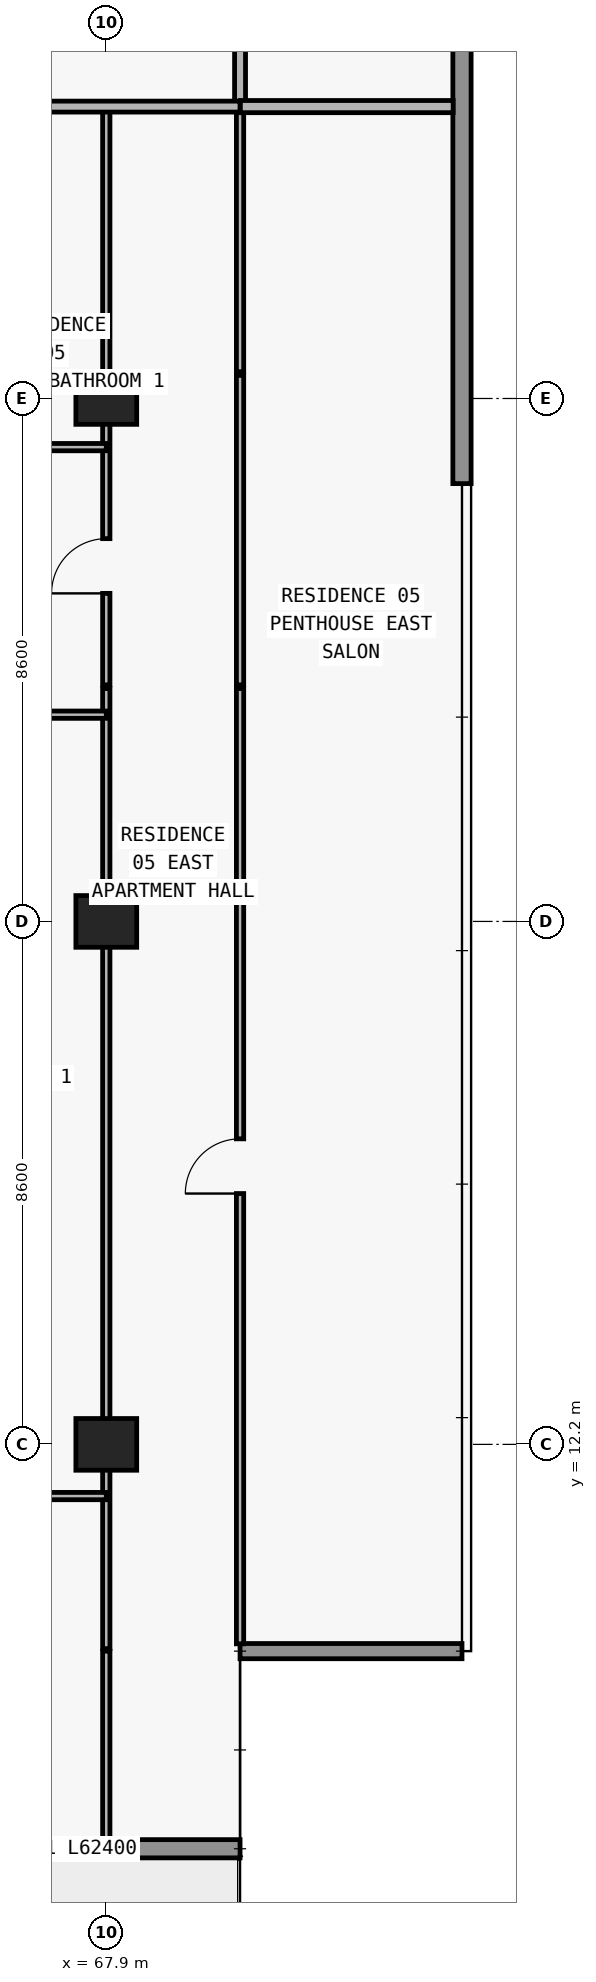
"""IFC4 building model, lengths in metres.
Left out: names, types, materials, properties, quantities, classifications, styles, units other than length and angle.
Written with IfcOpenShell. Run it as: python <this file> out.ifc"""

import sys

from ifc_helpers import new_model, si_unit, direction, frame, frame_2d, origin, origin_2d, place, context, subcontext, project, spatial, rectangle, extrude, element, fill, save


model = new_model("IFC4")
c1 = context("Model", 3, precision=1e-05, world=origin(), true_north=direction((0.0, 1.0)))
c2 = subcontext(c1, "Body", "Model", "MODEL_VIEW")
j1 = project(units=[si_unit("LENGTHUNIT", "METRE"), si_unit("PLANEANGLEUNIT", "RADIAN")], contexts=[c1])
p1 = place(None, origin())
s1 = spatial("IfcSite", under=j1, at=p1, CompositionType="ELEMENT")
p2 = place(p1, origin())
s2 = spatial("IfcBuilding", under=s1, at=p2, CompositionType="ELEMENT")
p3 = place(p2, frame((0.0, 0.0, 145.5)))
s3 = spatial("IfcBuildingStorey", under=s2, at=p3, CompositionType="ELEMENT", Elevation=145.5)
for number, where, z_axis, x_axis in (
    (1, (67.9, 12.2, 0.0), (0.0, 0.0, 1.0), (1.0, 0.0, 0.0)),
    (2, (67.9, 20.8, 0.0), (0.0, 0.0, 1.0), (1.0, 0.0, 0.0)),
    (3, (67.9, 29.4, 0.0), (0.0, 0.0, 1.0), (1.0, 0.0, 0.0)),
):
    element("IfcColumn", number, at=place(p3, frame(where, z_axis=z_axis, x_axis=x_axis)), inside=s3, PredefinedType="COLUMN", context=c2, shape_type="SweptSolid", body=[
        extrude(rectangle(XDim=1.0, YDim=0.85, at=origin_2d()), origin(), (0.0, 0.0, 1.0), 3.05),
    ])
p4 = place(p3, frame((70.1, 5.55, 0.0), z_axis=(0.0, 0.0, 1.0), x_axis=(-1.0, 0.0, 0.0)))
e4 = element("IfcWall", 4, at=p4, inside=s3, PredefinedType="STANDARD", context=c2, shape_type="SweptSolid", body=[
    extrude(rectangle(XDim=62.4, YDim=0.3, at=frame_2d((31.2, 0.0))), origin(), (0.0, 0.0, 1.0), 3.05),
])
p5 = place(p4, frame((57.226, 0.0, 0.0)))
e5 = element("IfcOpeningElement", 5, at=p5, cuts=e4, PredefinedType="OPENING", context=c2, shape_type="SweptSolid", body=[
    extrude(rectangle(XDim=2.0, YDim=2.3, at=frame_2d((1.0, 1.15))), frame((0.0, 0.16, 0.0), z_axis=(0.0, -1.0, 0.0), x_axis=(1.0, 0.0, 0.0)), (0.0, 0.0, 1.0), 0.32),
])
p6 = place(p4, frame((52.926, 0.0, 0.85)))
e6 = element("IfcOpeningElement", 6, at=p6, cuts=e4, PredefinedType="OPENING", context=c2, shape_type="SweptSolid", body=[
    extrude(rectangle(XDim=2.2, YDim=1.55, at=frame_2d((1.1, 0.775))), frame((0.0, 0.16, 0.0), z_axis=(0.0, -1.0, 0.0), x_axis=(1.0, 0.0, 0.0)), (0.0, 0.0, 1.0), 0.32),
])
p7 = place(p4, frame((48.49, 0.0, 0.0)))
e7 = element("IfcOpeningElement", 7, at=p7, cuts=e4, PredefinedType="OPENING", context=c2, shape_type="SweptSolid", body=[
    extrude(rectangle(XDim=2.0, YDim=2.3, at=frame_2d((1.0, 1.15))), frame((0.0, 0.16, 0.0), z_axis=(0.0, -1.0, 0.0), x_axis=(1.0, 0.0, 0.0)), (0.0, 0.0, 1.0), 0.32),
])
p8 = place(p4, frame((44.39, 0.0, 0.85)))
e8 = element("IfcOpeningElement", 8, at=p8, cuts=e4, PredefinedType="OPENING", context=c2, shape_type="SweptSolid", body=[
    extrude(rectangle(XDim=1.8, YDim=1.55, at=frame_2d((0.9, 0.775))), frame((0.0, 0.16, 0.0), z_axis=(0.0, -1.0, 0.0), x_axis=(1.0, 0.0, 0.0)), (0.0, 0.0, 1.0), 0.32),
])
p9 = place(p4, frame((40.426, 0.0, 0.0)))
e9 = element("IfcOpeningElement", 9, at=p9, cuts=e4, PredefinedType="OPENING", context=c2, shape_type="SweptSolid", body=[
    extrude(rectangle(XDim=2.0, YDim=2.3, at=frame_2d((1.0, 1.15))), frame((0.0, 0.16, 0.0), z_axis=(0.0, -1.0, 0.0), x_axis=(1.0, 0.0, 0.0)), (0.0, 0.0, 1.0), 0.32),
])
p10 = place(p4, frame((36.126, 0.0, 0.85)))
e10 = element("IfcOpeningElement", 10, at=p10, cuts=e4, PredefinedType="OPENING", context=c2, shape_type="SweptSolid", body=[
    extrude(rectangle(XDim=2.2, YDim=1.55, at=frame_2d((1.1, 0.775))), frame((0.0, 0.16, 0.0), z_axis=(0.0, -1.0, 0.0), x_axis=(1.0, 0.0, 0.0)), (0.0, 0.0, 1.0), 0.32),
])
p11 = place(p4, frame((32.09, 0.0, 0.0)))
e11 = element("IfcOpeningElement", 11, at=p11, cuts=e4, PredefinedType="OPENING", context=c2, shape_type="SweptSolid", body=[
    extrude(rectangle(XDim=2.0, YDim=2.3, at=frame_2d((1.0, 1.15))), frame((0.0, 0.16, 0.0), z_axis=(0.0, -1.0, 0.0), x_axis=(1.0, 0.0, 0.0)), (0.0, 0.0, 1.0), 0.32),
])
p12 = place(p4, frame((28.21, 0.0, 0.65)))
e12 = element("IfcOpeningElement", 12, at=p12, cuts=e4, PredefinedType="OPENING", context=c2, shape_type="SweptSolid", body=[
    extrude(rectangle(XDim=2.6, YDim=1.85, at=frame_2d((1.3, 0.925))), frame((0.0, 0.16, 0.0), z_axis=(0.0, -1.0, 0.0), x_axis=(1.0, 0.0, 0.0)), (0.0, 0.0, 1.0), 0.32),
])
p13 = place(p4, frame((22.1, 0.0, 0.85)))
e13 = element("IfcOpeningElement", 13, at=p13, cuts=e4, PredefinedType="OPENING", context=c2, shape_type="SweptSolid", body=[
    extrude(rectangle(XDim=2.2, YDim=1.55, at=frame_2d((1.1, 0.775))), frame((0.0, 0.16, 0.0), z_axis=(0.0, -1.0, 0.0), x_axis=(1.0, 0.0, 0.0)), (0.0, 0.0, 1.0), 0.32),
])
p14 = place(p4, frame((16.09, 0.0, 0.0)))
e14 = element("IfcOpeningElement", 14, at=p14, cuts=e4, PredefinedType="OPENING", context=c2, shape_type="SweptSolid", body=[
    extrude(rectangle(XDim=2.0, YDim=2.3, at=frame_2d((1.0, 1.15))), frame((0.0, 0.16, 0.0), z_axis=(0.0, -1.0, 0.0), x_axis=(1.0, 0.0, 0.0)), (0.0, 0.0, 1.0), 0.32),
])
p15 = place(p4, frame((11.41, 0.0, 0.65)))
e15 = element("IfcOpeningElement", 15, at=p15, cuts=e4, PredefinedType="OPENING", context=c2, shape_type="SweptSolid", body=[
    extrude(rectangle(XDim=2.6, YDim=1.85, at=frame_2d((1.3, 0.925))), frame((0.0, 0.16, 0.0), z_axis=(0.0, -1.0, 0.0), x_axis=(1.0, 0.0, 0.0)), (0.0, 0.0, 1.0), 0.32),
])
p16 = place(p4, frame((5.3, 0.0, 0.85)))
e16 = element("IfcOpeningElement", 16, at=p16, cuts=e4, PredefinedType="OPENING", context=c2, shape_type="SweptSolid", body=[
    extrude(rectangle(XDim=2.2, YDim=1.55, at=frame_2d((1.1, 0.775))), frame((0.0, 0.16, 0.0), z_axis=(0.0, -1.0, 0.0), x_axis=(1.0, 0.0, 0.0)), (0.0, 0.0, 1.0), 0.32),
])
p17 = place(p3, frame((70.1, 8.8, 0.0), z_axis=(0.0, 0.0, 1.0), x_axis=(1.0, 0.0, 0.0)))
e17 = element("IfcWall", 17, at=p17, inside=s3, PredefinedType="ELEMENTEDWALL", context=c2, shape_type="SweptSolid", body=[
    extrude(rectangle(XDim=3.65, YDim=0.25, at=frame_2d((1.825, 0.0))), origin(), (0.0, 0.0, 1.0), 3.05),
])
p18 = place(p3, frame((73.75, 47.2, 0.0), z_axis=(0.0, 0.0, 1.0), x_axis=(0.0, -1.0, 0.0)))
e18 = element("IfcWall", 18, at=p18, inside=s3, PredefinedType="STANDARD", context=c2, shape_type="SweptSolid", body=[
    extrude(rectangle(XDim=19.2, YDim=0.3, at=frame_2d((9.6, 0.0))), origin(), (0.0, 0.0, 1.0), 3.05),
])
p19 = place(p3, frame((67.9, 5.695, 0.0), z_axis=(0.0, 0.0, 1.0), x_axis=(0.0, 1.0, 0.0)))
e19 = element("IfcWall", 19, at=p19, inside=s3, PredefinedType="PARTITIONING", context=c2, shape_type="SweptSolid", body=[
    extrude(rectangle(XDim=3.105, YDim=0.12, at=frame_2d((1.552, 0.0))), origin(), (0.0, 0.0, 1.0), 3.05),
])
p20 = place(p3, frame((67.9, 8.84, 0.0), z_axis=(0.0, 0.0, 1.0), x_axis=(0.0, 1.0, 0.0)))
e20 = element("IfcWall", 20, at=p20, inside=s3, PredefinedType="PARTITIONING", context=c2, shape_type="SweptSolid", body=[
    extrude(rectangle(XDim=15.79, YDim=0.12, at=frame_2d((7.895, 0.0))), origin(), (0.0, 0.0, 1.0), 2.174),
])
p21 = place(p3, frame((67.9, 24.69, 0.0), z_axis=(0.0, 0.0, 1.0), x_axis=(0.0, 1.0, 0.0)))
e21 = element("IfcWall", 21, at=p21, inside=s3, PredefinedType="PARTITIONING", context=c2, shape_type="SweptSolid", body=[
    extrude(rectangle(XDim=5.09, YDim=0.12, at=frame_2d((2.545, 0.0))), origin(), (0.0, 0.0, 1.0), 2.174),
])
p22 = place(p21, frame((1.505, 0.0, 0.0)))
e22 = element("IfcOpeningElement", 22, at=p22, cuts=e21, PredefinedType="OPENING", context=c2, shape_type="SweptSolid", body=[
    extrude(rectangle(XDim=0.9, YDim=2.124, at=frame_2d((0.45, 1.062))), frame((0.0, 0.07, 0.0), z_axis=(0.0, -1.0, 0.0), x_axis=(1.0, 0.0, 0.0)), (0.0, 0.0, 1.0), 0.14),
])
p23 = place(p3, frame((67.9, 29.84, 0.0), z_axis=(0.0, 0.0, 1.0), x_axis=(0.0, 1.0, 0.0)))
e23 = element("IfcWall", 23, at=p23, inside=s3, PredefinedType="PARTITIONING", context=c2, shape_type="SweptSolid", body=[
    extrude(rectangle(XDim=4.36, YDim=0.12, at=frame_2d((2.18, 0.0))), origin(), (0.0, 0.0, 1.0), 2.174),
])
p24 = place(p3, frame((70.1, 8.92, 0.0), z_axis=(0.0, 0.0, 1.0), x_axis=(0.0, 1.0, 0.0)))
e24 = element("IfcWall", 24, at=p24, inside=s3, PredefinedType="PARTITIONING", context=c2, shape_type="SweptSolid", body=[
    extrude(rectangle(XDim=15.71, YDim=0.12, at=frame_2d((7.855, 0.0))), origin(), (0.0, 0.0, 1.0), 3.05),
])
p25 = place(p24, frame((7.405, 0.0, 0.0)))
e25 = element("IfcOpeningElement", 25, at=p25, cuts=e24, PredefinedType="OPENING", context=c2, shape_type="SweptSolid", body=[
    extrude(rectangle(XDim=0.9, YDim=2.15, at=frame_2d((0.45, 1.075))), frame((0.0, 0.07, 0.0), z_axis=(0.0, -1.0, 0.0), x_axis=(1.0, 0.0, 0.0)), (0.0, 0.0, 1.0), 0.14),
])
p26 = place(p3, frame((70.1, 24.69, 0.0), z_axis=(0.0, 0.0, 1.0), x_axis=(0.0, 1.0, 0.0)))
e26 = element("IfcWall", 26, at=p26, inside=s3, PredefinedType="PARTITIONING", context=c2, shape_type="SweptSolid", body=[
    extrude(rectangle(XDim=5.09, YDim=0.12, at=frame_2d((2.545, 0.0))), origin(), (0.0, 0.0, 1.0), 3.05),
])
p27 = place(p3, frame((70.1, 29.84, 0.0), z_axis=(0.0, 0.0, 1.0), x_axis=(0.0, 1.0, 0.0)))
e27 = element("IfcWall", 27, at=p27, inside=s3, PredefinedType="PARTITIONING", context=c2, shape_type="SweptSolid", body=[
    extrude(rectangle(XDim=4.36, YDim=0.12, at=frame_2d((2.18, 0.0))), origin(), (0.0, 0.0, 1.0), 3.05),
])
p28 = place(p3, frame((70.1, 34.205, 0.0), z_axis=(0.0, 0.0, 1.0), x_axis=(0.0, 1.0, 0.0)))
e28 = element("IfcWall", 28, at=p28, inside=s3, PredefinedType="PARTITIONING", context=c2, shape_type="SweptSolid", body=[
    extrude(rectangle(XDim=2.745, YDim=0.18, at=frame_2d((1.373, 0.0))), origin(), (0.0, 0.0, 1.0), 3.05),
])
p29 = place(p3, frame((59.55, 11.35, 0.0), z_axis=(0.0, 0.0, 1.0), x_axis=(1.0, 0.0, 0.0)))
e29 = element("IfcWall", 29, at=p29, inside=s3, PredefinedType="PARTITIONING", context=c2, shape_type="SweptSolid", body=[
    extrude(rectangle(XDim=8.35, YDim=0.12, at=frame_2d((4.175, 0.0))), origin(), (0.0, 0.0, 1.0), 3.05),
])
p30 = place(p29, frame((3.725, 0.0, 0.0)))
e30 = element("IfcOpeningElement", 30, at=p30, cuts=e29, PredefinedType="OPENING", context=c2, shape_type="SweptSolid", body=[
    extrude(rectangle(XDim=0.9, YDim=2.15, at=frame_2d((0.45, 1.075))), frame((0.0, 0.07, 0.0), z_axis=(0.0, -1.0, 0.0), x_axis=(1.0, 0.0, 0.0)), (0.0, 0.0, 1.0), 0.14),
])
p31 = place(p3, frame((59.55, 24.2, 0.0), z_axis=(0.0, 0.0, 1.0), x_axis=(1.0, 0.0, 0.0)))
e31 = element("IfcWall", 31, at=p31, inside=s3, PredefinedType="PARTITIONING", context=c2, shape_type="SweptSolid", body=[
    extrude(rectangle(XDim=8.35, YDim=0.12, at=frame_2d((4.175, 0.0))), origin(), (0.0, 0.0, 1.0), 3.05),
])
p32 = place(p31, frame((3.725, 0.0, 0.0)))
e32 = element("IfcOpeningElement", 32, at=p32, cuts=e31, PredefinedType="OPENING", context=c2, shape_type="SweptSolid", body=[
    extrude(rectangle(XDim=0.9, YDim=2.15, at=frame_2d((0.45, 1.075))), frame((0.0, 0.07, 0.0), z_axis=(0.0, -1.0, 0.0), x_axis=(1.0, 0.0, 0.0)), (0.0, 0.0, 1.0), 0.14),
])
p33 = place(p3, frame((59.55, 28.6, 0.0), z_axis=(0.0, 0.0, 1.0), x_axis=(1.0, 0.0, 0.0)))
e33 = element("IfcWall", 33, at=p33, inside=s3, PredefinedType="PARTITIONING", context=c2, shape_type="SweptSolid", body=[
    extrude(rectangle(XDim=8.35, YDim=0.12, at=frame_2d((4.175, 0.0))), origin(), (0.0, 0.0, 1.0), 3.05),
])
p34 = place(p33, frame((2.868, 0.0, 0.0)))
e34 = element("IfcOpeningElement", 34, at=p34, cuts=e33, PredefinedType="OPENING", context=c2, shape_type="SweptSolid", body=[
    extrude(rectangle(XDim=0.9, YDim=2.15, at=frame_2d((0.45, 1.075))), frame((0.0, 0.07, 0.0), z_axis=(0.0, -1.0, 0.0), x_axis=(1.0, 0.0, 0.0)), (0.0, 0.0, 1.0), 0.14),
])
p35 = place(p3, frame((59.55, 34.2, 0.0), z_axis=(0.0, 0.0, 1.0), x_axis=(1.0, 0.0, 0.0)))
e35 = element("IfcWall", 35, at=p35, inside=s3, PredefinedType="PARTITIONING", context=c2, shape_type="SweptSolid", body=[
    extrude(rectangle(XDim=10.55, YDim=0.18, at=frame_2d((5.275, 0.0))), origin(), (0.0, 0.0, 1.0), 3.05),
])
p36 = place(p3, frame((70.105, 34.2, 0.0), z_axis=(0.0, 0.0, 1.0), x_axis=(1.0, 0.0, 0.0)))
e36 = element("IfcWall", 36, at=p36, inside=s3, PredefinedType="PARTITIONING", context=c2, shape_type="SweptSolid", body=[
    extrude(rectangle(XDim=3.5, YDim=0.2, at=frame_2d((1.75, 0.0))), origin(), (0.0, 0.0, 1.0), 3.05),
])
p37 = place(p22, origin())
e37 = element("IfcDoor", 37, at=p37, inside=s3, OperationType="SINGLE_SWING_LEFT", PredefinedType="DOOR", context=c2, shape_type="SweptSolid", body=[
    extrude(rectangle(XDim=0.9, YDim=2.124, at=frame_2d((0.45, 1.062))), frame((0.0, 0.025, 0.0), z_axis=(0.0, -1.0, 0.0), x_axis=(1.0, 0.0, 0.0)), (0.0, 0.0, 1.0), 0.05),
])
fill(e22, e37)
p38 = place(p25, origin())
e38 = element("IfcDoor", 38, at=p38, inside=s3, OperationType="SINGLE_SWING_LEFT", PredefinedType="DOOR", context=c2, shape_type="SweptSolid", body=[
    extrude(rectangle(XDim=0.9, YDim=2.15, at=frame_2d((0.45, 1.075))), frame((0.0, 0.025, 0.0), z_axis=(0.0, -1.0, 0.0), x_axis=(1.0, 0.0, 0.0)), (0.0, 0.0, 1.0), 0.05),
])
fill(e25, e38)
save(model, sys.argv[1])
